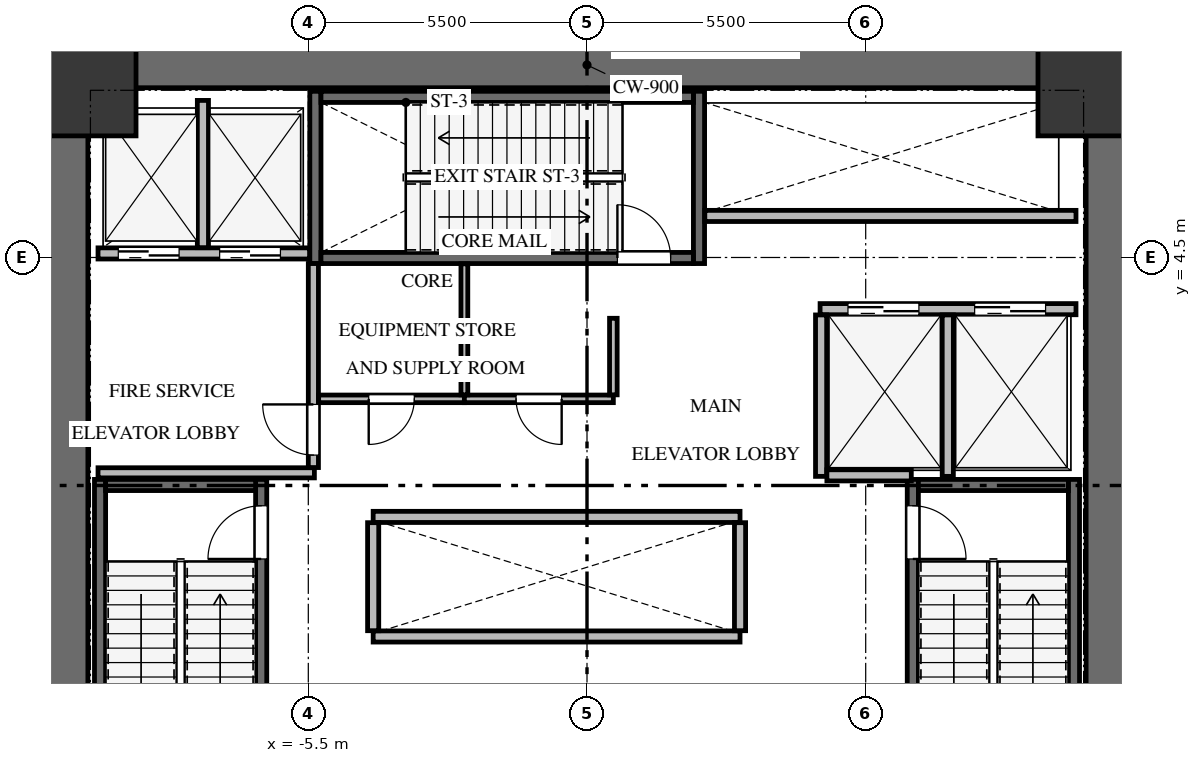
"""IFC4 building model, lengths in metres.
Left out: names, types, materials, properties, quantities, classifications, styles, units other than length and angle.
Written with IfcOpenShell. Run it as: python <this file> out.ifc"""

import sys

from ifc_helpers import new_model, si_unit, direction, frame, frame_2d, origin, origin_2d, place, context, subcontext, project, spatial, rectangle, extrude, source, transform, mapped, element, fill, save


model = new_model("IFC4")
c1 = context("Model", 3, precision=1e-05, world=origin(), true_north=direction((0.0, 1.0)))
c2 = subcontext(c1, "Body", "Model", "MODEL_VIEW")
j1 = project(units=[si_unit("LENGTHUNIT", "METRE"), si_unit("PLANEANGLEUNIT", "RADIAN")], contexts=[c1])
p1 = place(None, origin())
s1 = spatial("IfcSite", under=j1, at=p1, CompositionType="ELEMENT")
p2 = place(p1, origin())
s2 = spatial("IfcBuilding", under=s1, at=p2, CompositionType="ELEMENT")
p3 = place(p2, frame((0.0, 0.0, 15.6)))
s3 = spatial("IfcBuildingStorey", under=s2, at=p3, CompositionType="ELEMENT", Elevation=15.6)
for number, where, z_axis, x_axis in (
    (1, (-10.3, -8.75, 0.0), (0.0, 0.0, 1.0), (0.0, 1.0, 0.0)),
    (2, (10.3, -8.75, 0.0), (0.0, 0.0, 1.0), (0.0, 1.0, 0.0)),
):
    element("IfcWall", number, at=place(p3, frame(where, z_axis=z_axis, x_axis=x_axis)), inside=s3, PredefinedType="SHEAR", context=c2, shape_type="SweptSolid", body=[
        extrude(rectangle(XDim=17.5, YDim=0.9, at=frame_2d((8.75, 0.0))), origin(), (0.0, 0.0, 1.0), 5.6),
    ])
p4 = place(p3, frame((-9.85, 8.3, 0.0), z_axis=(0.0, 0.0, 1.0), x_axis=(1.0, 0.0, 0.0)))
e3 = element("IfcWall", 3, at=p4, inside=s3, PredefinedType="SHEAR", context=c2, shape_type="SweptSolid", body=[
    extrude(rectangle(XDim=19.7, YDim=0.9, at=frame_2d((9.85, 0.0))), origin(), (0.0, 0.0, 1.0), 5.6),
])
p5 = place(p3, frame((-6.43, -7.77, -0.32), z_axis=(0.0, 0.0, 1.0), x_axis=(0.0, 1.0, 0.0)))
e4 = element("IfcWall", 4, at=p5, inside=s3, PredefinedType="SHEAR", context=c2, shape_type="SweptSolid", body=[
    extrude(rectangle(XDim=7.89, YDim=0.22, at=frame_2d((3.945, 0.0))), origin(), (0.0, 0.0, 1.0), 5.6),
])
p6 = place(p5, frame((6.32, 0.0, 0.0)))
e5 = element("IfcOpeningElement", 5, at=p6, cuts=e4, PredefinedType="OPENING", context=c2, shape_type="SweptSolid", body=[
    extrude(rectangle(XDim=1.05, YDim=2.15, at=frame_2d((0.525, 1.075))), frame((0.0, 0.12, 0.0), z_axis=(0.0, -1.0, 0.0), x_axis=(1.0, 0.0, 0.0)), (0.0, 0.0, 1.0), 0.24),
])
p7 = place(p3, frame((-9.61, 0.12, -0.32), z_axis=(0.0, 0.0, 1.0), x_axis=(0.0, -1.0, 0.0)))
e6 = element("IfcWall", 6, at=p7, inside=s3, PredefinedType="SHEAR", context=c2, shape_type="SweptSolid", body=[
    extrude(rectangle(XDim=7.89, YDim=0.22, at=frame_2d((3.945, 0.0))), origin(), (0.0, 0.0, 1.0), 5.6),
])
p8 = place(p3, frame((-6.54, 0.01, -0.32), z_axis=(0.0, 0.0, 1.0), x_axis=(-1.0, 0.0, 0.0)))
e7 = element("IfcWall", 7, at=p8, inside=s3, PredefinedType="SHEAR", context=c2, shape_type="SweptSolid", body=[
    extrude(rectangle(XDim=2.96, YDim=0.22, at=frame_2d((1.48, 0.0))), origin(), (0.0, 0.0, 1.0), 5.6),
])
p9 = place(p3, frame((9.61, -7.77, -0.32), z_axis=(0.0, 0.0, 1.0), x_axis=(0.0, 1.0, 0.0)))
e8 = element("IfcWall", 8, at=p9, inside=s3, PredefinedType="SHEAR", context=c2, shape_type="SweptSolid", body=[
    extrude(rectangle(XDim=7.89, YDim=0.22, at=frame_2d((3.945, 0.0))), origin(), (0.0, 0.0, 1.0), 5.6),
])
p10 = place(p3, frame((6.43, 0.12, -0.32), z_axis=(0.0, 0.0, 1.0), x_axis=(0.0, -1.0, 0.0)))
e9 = element("IfcWall", 9, at=p10, inside=s3, PredefinedType="SHEAR", context=c2, shape_type="SweptSolid", body=[
    extrude(rectangle(XDim=7.89, YDim=0.22, at=frame_2d((3.945, 0.0))), origin(), (0.0, 0.0, 1.0), 5.6),
])
p11 = place(p10, frame((0.52, 0.0, 0.0)))
e10 = element("IfcOpeningElement", 10, at=p11, cuts=e9, PredefinedType="OPENING", context=c2, shape_type="SweptSolid", body=[
    extrude(rectangle(XDim=1.05, YDim=2.15, at=frame_2d((0.525, 1.075))), frame((0.0, 0.12, 0.0), z_axis=(0.0, -1.0, 0.0), x_axis=(1.0, 0.0, 0.0)), (0.0, 0.0, 1.0), 0.24),
])
p12 = place(p3, frame((9.5, 0.01, -0.32), z_axis=(0.0, 0.0, 1.0), x_axis=(-1.0, 0.0, 0.0)))
e11 = element("IfcWall", 11, at=p12, inside=s3, PredefinedType="SHEAR", context=c2, shape_type="SweptSolid", body=[
    extrude(rectangle(XDim=2.96, YDim=0.22, at=frame_2d((1.48, 0.0))), origin(), (0.0, 0.0, 1.0), 5.6),
])
for number, where, z_axis, x_axis in (
    (12, (2.21, 4.38, -0.32), (0.0, 0.0, 1.0), (0.0, 1.0, 0.0)),
    (13, (-5.36, 7.78, -0.32), (0.0, 0.0, 1.0), (0.0, -1.0, 0.0)),
):
    element("IfcWall", number, at=place(p3, frame(where, z_axis=z_axis, x_axis=x_axis)), inside=s3, PredefinedType="SHEAR", context=c2, shape_type="SweptSolid", body=[
        extrude(rectangle(XDim=3.4, YDim=0.22, at=frame_2d((1.7, 0.0))), origin(), (0.0, 0.0, 1.0), 5.6),
    ])
p13 = place(p3, frame((-5.25, 4.49, -0.32), z_axis=(0.0, 0.0, 1.0), x_axis=(1.0, 0.0, 0.0)))
e14 = element("IfcWall", 14, at=p13, inside=s3, PredefinedType="SHEAR", context=c2, shape_type="SweptSolid", body=[
    extrude(rectangle(XDim=7.35, YDim=0.22, at=frame_2d((3.675, 0.0))), origin(), (0.0, 0.0, 1.0), 5.6),
])
p14 = place(p13, frame((5.85, 0.0, 0.0)))
e15 = element("IfcOpeningElement", 15, at=p14, cuts=e14, PredefinedType="OPENING", context=c2, shape_type="SweptSolid", body=[
    extrude(rectangle(XDim=1.05, YDim=2.15, at=frame_2d((0.525, 1.075))), frame((0.0, 0.12, 0.0), z_axis=(0.0, -1.0, 0.0), x_axis=(1.0, 0.0, 0.0)), (0.0, 0.0, 1.0), 0.24),
])
p15 = place(p3, frame((2.1, 7.67, -0.32), z_axis=(0.0, 0.0, 1.0), x_axis=(-1.0, 0.0, 0.0)))
e16 = element("IfcWall", 16, at=p15, inside=s3, PredefinedType="SHEAR", context=c2, shape_type="SweptSolid", body=[
    extrude(rectangle(XDim=7.35, YDim=0.22, at=frame_2d((3.675, 0.0))), origin(), (0.0, 0.0, 1.0), 5.6),
])
m1 = source(origin(), c2, "Body", "SweptSolid", [
    extrude(rectangle(XDim=1.8, YDim=1.8, at=origin_2d()), origin(), (0.0, 0.0, 1.0), 5.6),
])
for number, where, z_axis, x_axis in (
    (17, (9.8, 7.8, -0.32), (0.0, 0.0, 1.0), (1.0, 0.0, 0.0)),
    (18, (-9.8, 7.8, -0.32), (0.0, 0.0, 1.0), (1.0, 0.0, 0.0)),
):
    element("IfcColumn", number, at=place(p3, frame(where, z_axis=z_axis, x_axis=x_axis)), inside=s3, PredefinedType="COLUMN", context=c2, shape_type="MappedRepresentation", body=[
        mapped(m1, transform((0.0, 0.0, 0.0), x_axis=(1.0, 0.0, 0.0), y_axis=(0.0, 1.0, 0.0), z_axis=(0.0, 0.0, 1.0), scale=1.0)),
    ])
p16 = place(p3, frame((-9.65, 4.58, 0.0), z_axis=(0.0, 0.0, 1.0), x_axis=(1.0, 0.0, 0.0)))
e19 = element("IfcWall", 19, at=p16, inside=s3, PredefinedType="SOLIDWALL", context=c2, shape_type="SweptSolid", body=[
    extrude(rectangle(XDim=4.175, YDim=0.22, at=frame_2d((2.087, 0.0))), origin(), (0.0, 0.0, 1.0), 5.265),
])
p17 = place(p16, frame((0.4, 0.0, 0.0)))
e20 = element("IfcOpeningElement", 20, at=p17, cuts=e19, PredefinedType="OPENING", context=c2, shape_type="SweptSolid", body=[
    extrude(rectangle(XDim=1.2, YDim=2.15, at=frame_2d((0.6, 1.075))), frame((0.0, 0.12, 0.0), z_axis=(0.0, -1.0, 0.0), x_axis=(1.0, 0.0, 0.0)), (0.0, 0.0, 1.0), 0.24),
])
p18 = place(p16, frame((2.4, 0.0, 0.0)))
e21 = element("IfcOpeningElement", 21, at=p18, cuts=e19, PredefinedType="OPENING", context=c2, shape_type="SweptSolid", body=[
    extrude(rectangle(XDim=1.2, YDim=2.15, at=frame_2d((0.6, 1.075))), frame((0.0, 0.12, 0.0), z_axis=(0.0, -1.0, 0.0), x_axis=(1.0, 0.0, 0.0)), (0.0, 0.0, 1.0), 0.24),
])
p19 = place(p3, frame((-7.58, 4.694, 0.0), z_axis=(0.0, 0.0, 1.0), x_axis=(0.0, 1.0, 0.0)))
e22 = element("IfcWall", 22, at=p19, inside=s3, PredefinedType="SOLIDWALL", context=c2, shape_type="SweptSolid", body=[
    extrude(rectangle(XDim=2.906, YDim=0.22, at=frame_2d((1.453, 0.0))), origin(), (0.0, 0.0, 1.0), 5.265),
])
p20 = place(p3, frame((-9.65, 0.25, 0.0), z_axis=(0.0, 0.0, 1.0), x_axis=(1.0, 0.0, 0.0)))
e23 = element("IfcWall", 23, at=p20, inside=s3, PredefinedType="SOLIDWALL", context=c2, shape_type="SweptSolid", body=[
    extrude(rectangle(XDim=4.27, YDim=0.2, at=frame_2d((2.135, 0.0))), origin(), (0.0, 0.0, 1.0), 5.265),
])
p21 = place(p3, frame((-5.4, 0.354, 0.0), z_axis=(0.0, 0.0, 1.0), x_axis=(0.0, 1.0, 0.0)))
e24 = element("IfcWall", 24, at=p21, inside=s3, PredefinedType="SOLIDWALL", context=c2, shape_type="SweptSolid", body=[
    extrude(rectangle(XDim=4.026, YDim=0.2, at=frame_2d((2.013, 0.0))), origin(), (0.0, 0.0, 1.0), 5.265),
])
p22 = place(p21, frame((0.246, 0.0, 0.0)))
e25 = element("IfcOpeningElement", 25, at=p22, cuts=e24, PredefinedType="OPENING", context=c2, shape_type="SweptSolid", body=[
    extrude(rectangle(XDim=1.0, YDim=2.15, at=frame_2d((0.5, 1.075))), frame((0.0, 0.11, 0.0), z_axis=(0.0, -1.0, 0.0), x_axis=(1.0, 0.0, 0.0)), (0.0, 0.0, 1.0), 0.22),
])
p23 = place(p3, frame((4.6, 3.48, 0.0), z_axis=(0.0, 0.0, 1.0), x_axis=(1.0, 0.0, 0.0)))
e26 = element("IfcWall", 26, at=p23, inside=s3, PredefinedType="SOLIDWALL", context=c2, shape_type="SweptSolid", body=[
    extrude(rectangle(XDim=5.05, YDim=0.22, at=frame_2d((2.525, 0.0))), origin(), (0.0, 0.0, 1.0), 5.265),
])
p24 = place(p23, frame((0.55, 0.0, 0.0)))
e27 = element("IfcOpeningElement", 27, at=p24, cuts=e26, PredefinedType="OPENING", context=c2, shape_type="SweptSolid", body=[
    extrude(rectangle(XDim=1.4, YDim=2.15, at=frame_2d((0.7, 1.075))), frame((0.0, 0.12, 0.0), z_axis=(0.0, -1.0, 0.0), x_axis=(1.0, 0.0, 0.0)), (0.0, 0.0, 1.0), 0.24),
])
p25 = place(p23, frame((3.05, 0.0, 0.0)))
e28 = element("IfcOpeningElement", 28, at=p25, cuts=e26, PredefinedType="OPENING", context=c2, shape_type="SweptSolid", body=[
    extrude(rectangle(XDim=1.4, YDim=2.15, at=frame_2d((0.7, 1.075))), frame((0.0, 0.12, 0.0), z_axis=(0.0, -1.0, 0.0), x_axis=(1.0, 0.0, 0.0)), (0.0, 0.0, 1.0), 0.24),
])
for number, where, z_axis, x_axis in (
    (29, (4.62, 0.18, 0.0), (0.0, 0.0, 1.0), (0.0, 1.0, 0.0)),
    (30, (7.12, 0.18, 0.0), (0.0, 0.0, 1.0), (0.0, 1.0, 0.0)),
):
    element("IfcWall", number, at=place(p3, frame(where, z_axis=z_axis, x_axis=x_axis)), inside=s3, PredefinedType="SOLIDWALL", context=c2, shape_type="SweptSolid", body=[
        extrude(rectangle(XDim=3.186, YDim=0.22, at=frame_2d((1.593, 0.0))), origin(), (0.0, 0.0, 1.0), 5.265),
    ])
p26 = place(p3, frame((4.734, 0.2, 0.0), z_axis=(0.0, 0.0, 1.0), x_axis=(1.0, 0.0, 0.0)))
e31 = element("IfcWall", 31, at=p26, inside=s3, PredefinedType="SOLIDWALL", context=c2, shape_type="SweptSolid", body=[
    extrude(rectangle(XDim=1.666, YDim=0.22, at=frame_2d((0.833, 0.0))), origin(), (0.0, 0.0, 1.0), 5.265),
])
for number, where, z_axis, x_axis in (
    (32, (-4.22, -2.98, 0.0), (0.0, 0.0, 1.0), (1.0, 0.0, 0.0)),
    (33, (-4.22, -0.62, 0.0), (0.0, 0.0, 1.0), (1.0, 0.0, 0.0)),
):
    element("IfcWall", number, at=place(p3, frame(where, z_axis=z_axis, x_axis=x_axis)), inside=s3, PredefinedType="SOLIDWALL", context=c2, shape_type="SweptSolid", body=[
        extrude(rectangle(XDim=7.24, YDim=0.22, at=frame_2d((3.62, 0.0))), origin(), (0.0, 0.0, 1.0), 5.265),
    ])
for number, where, z_axis, x_axis in (
    (34, (-4.22, -2.866, 0.0), (0.0, 0.0, 1.0), (0.0, 1.0, 0.0)),
    (35, (3.02, -2.866, 0.0), (0.0, 0.0, 1.0), (0.0, 1.0, 0.0)),
):
    element("IfcWall", number, at=place(p3, frame(where, z_axis=z_axis, x_axis=x_axis)), inside=s3, PredefinedType="SOLIDWALL", context=c2, shape_type="SweptSolid", body=[
        extrude(rectangle(XDim=2.132, YDim=0.22, at=frame_2d((1.066, 0.0))), origin(), (0.0, 0.0, 1.0), 5.265),
    ])
p27 = place(p3, frame((2.325, 5.32, 0.0), z_axis=(0.0, 0.0, 1.0), x_axis=(1.0, 0.0, 0.0)))
e36 = element("IfcWall", 36, at=p27, inside=s3, PredefinedType="SOLIDWALL", context=c2, shape_type="SweptSolid", body=[
    extrude(rectangle(XDim=7.325, YDim=0.22, at=frame_2d((3.663, 0.0))), origin(), (0.0, 0.0, 1.0), 5.265),
])
p28 = place(p3, frame((-2.42, 1.71, 0.0), z_axis=(0.0, 0.0, 1.0), x_axis=(-1.0, 0.0, 0.0)))
e37 = element("IfcWall", 37, at=p28, inside=s3, PredefinedType="PARTITIONING", context=c2, shape_type="SweptSolid", body=[
    extrude(rectangle(XDim=2.876, YDim=0.15, at=frame_2d((1.438, 0.0))), origin(), (0.0, 0.0, 1.0), 5.265),
])
p29 = place(p28, frame((0.988, 0.0, 0.0)))
e38 = element("IfcOpeningElement", 38, at=p29, cuts=e37, PredefinedType="OPENING", context=c2, shape_type="SweptSolid", body=[
    extrude(rectangle(XDim=0.9, YDim=2.05, at=frame_2d((0.45, 1.025))), frame((0.0, 0.085, 0.0), z_axis=(0.0, -1.0, 0.0), x_axis=(1.0, 0.0, 0.0)), (0.0, 0.0, 1.0), 0.17),
])
p30 = place(p3, frame((0.52, 1.71, 0.0), z_axis=(0.0, 0.0, 1.0), x_axis=(-1.0, 0.0, 0.0)))
e39 = element("IfcWall", 39, at=p30, inside=s3, PredefinedType="PARTITIONING", context=c2, shape_type="SweptSolid", body=[
    extrude(rectangle(XDim=2.94, YDim=0.15, at=frame_2d((1.47, 0.0))), origin(), (0.0, 0.0, 1.0), 5.265),
])
p31 = place(p30, frame((1.02, 0.0, 0.0)))
e40 = element("IfcOpeningElement", 40, at=p31, cuts=e39, PredefinedType="OPENING", context=c2, shape_type="SweptSolid", body=[
    extrude(rectangle(XDim=0.9, YDim=2.05, at=frame_2d((0.45, 1.025))), frame((0.0, 0.085, 0.0), z_axis=(0.0, -1.0, 0.0), x_axis=(1.0, 0.0, 0.0)), (0.0, 0.0, 1.0), 0.17),
])
p32 = place(p3, frame((0.52, 3.3, 0.0), z_axis=(0.0, 0.0, 1.0), x_axis=(0.0, -1.0, 0.0)))
e41 = element("IfcWall", 41, at=p32, inside=s3, PredefinedType="PARTITIONING", context=c2, shape_type="SweptSolid", body=[
    extrude(rectangle(XDim=1.511, YDim=0.15, at=frame_2d((0.755, 0.0))), origin(), (0.0, 0.0, 1.0), 5.265),
])
p33 = place(p3, frame((-2.42, 4.375, 0.0), z_axis=(0.0, 0.0, 1.0), x_axis=(0.0, -1.0, 0.0)))
e42 = element("IfcWall", 42, at=p33, inside=s3, PredefinedType="PARTITIONING", context=c2, shape_type="SweptSolid", body=[
    extrude(rectangle(XDim=2.586, YDim=0.135, at=frame_2d((1.293, 0.0))), origin(), (0.0, 0.0, 1.0), 5.265),
])
m2 = source(origin(), c2, "Body", "SweptSolid", [
    extrude(rectangle(XDim=1.05, YDim=2.15, at=frame_2d((0.525, 1.075))), frame((0.0, 0.025, 0.0), z_axis=(0.0, -1.0, 0.0), x_axis=(1.0, 0.0, 0.0)), (0.0, 0.0, 1.0), 0.05),
])
p34 = place(p6, origin())
e43 = element("IfcDoor", 43, at=p34, inside=s3, OperationType="SINGLE_SWING_LEFT", PredefinedType="DOOR", context=c2, shape_type="MappedRepresentation", body=[
    mapped(m2, transform((0.0, 0.0, 0.0), x_axis=(1.0, 0.0, 0.0), y_axis=(0.0, 1.0, 0.0), z_axis=(0.0, 0.0, 1.0), scale=1.0)),
])
fill(e5, e43)
m3 = source(origin(), c2, "Body", "SweptSolid", [
    extrude(rectangle(XDim=1.05, YDim=2.15, at=frame_2d((0.525, 1.075))), frame((0.0, 0.025, 0.0), z_axis=(0.0, -1.0, 0.0), x_axis=(1.0, 0.0, 0.0)), (0.0, 0.0, 1.0), 0.05),
])
p35 = place(p11, origin())
e44 = element("IfcDoor", 44, at=p35, inside=s3, OperationType="SINGLE_SWING_RIGHT", PredefinedType="DOOR", context=c2, shape_type="MappedRepresentation", body=[
    mapped(m3, transform((0.0, 0.0, 0.0), x_axis=(1.0, 0.0, 0.0), y_axis=(0.0, 1.0, 0.0), z_axis=(0.0, 0.0, 1.0), scale=1.0)),
])
fill(e10, e44)
p36 = place(p14, origin())
e45 = element("IfcDoor", 45, at=p36, inside=s3, OperationType="SINGLE_SWING_LEFT", PredefinedType="DOOR", context=c2, shape_type="MappedRepresentation", body=[
    mapped(m2, transform((0.0, 0.0, 0.0), x_axis=(1.0, 0.0, 0.0), y_axis=(0.0, 1.0, 0.0), z_axis=(0.0, 0.0, 1.0), scale=1.0)),
])
fill(e15, e45)
m4 = source(origin(), c2, "Body", "SweptSolid", [
    extrude(rectangle(XDim=1.2, YDim=2.15, at=frame_2d((0.6, 1.075))), frame((0.0, 0.025, 0.0), z_axis=(0.0, -1.0, 0.0), x_axis=(1.0, 0.0, 0.0)), (0.0, 0.0, 1.0), 0.05),
])
p37 = place(p17, origin())
e46 = element("IfcDoor", 46, at=p37, inside=s3, OperationType="DOUBLE_DOOR_SLIDING", PredefinedType="DOOR", context=c2, shape_type="MappedRepresentation", body=[
    mapped(m4, transform((0.0, 0.0, 0.0), x_axis=(1.0, 0.0, 0.0), y_axis=(0.0, 1.0, 0.0), z_axis=(0.0, 0.0, 1.0), scale=1.0)),
])
fill(e20, e46)
p38 = place(p18, origin())
e47 = element("IfcDoor", 47, at=p38, inside=s3, OperationType="DOUBLE_DOOR_SLIDING", PredefinedType="DOOR", context=c2, shape_type="MappedRepresentation", body=[
    mapped(m4, transform((0.0, 0.0, 0.0), x_axis=(1.0, 0.0, 0.0), y_axis=(0.0, 1.0, 0.0), z_axis=(0.0, 0.0, 1.0), scale=1.0)),
])
fill(e21, e47)
m5 = source(origin(), c2, "Body", "SweptSolid", [
    extrude(rectangle(XDim=1.0, YDim=2.15, at=frame_2d((0.5, 1.075))), frame((0.0, 0.025, 0.0), z_axis=(0.0, -1.0, 0.0), x_axis=(1.0, 0.0, 0.0)), (0.0, 0.0, 1.0), 0.05),
])
p39 = place(p22, origin())
e48 = element("IfcDoor", 48, at=p39, inside=s3, OperationType="SINGLE_SWING_RIGHT", PredefinedType="DOOR", context=c2, shape_type="MappedRepresentation", body=[
    mapped(m5, transform((0.0, 0.0, 0.0), x_axis=(1.0, 0.0, 0.0), y_axis=(0.0, 1.0, 0.0), z_axis=(0.0, 0.0, 1.0), scale=1.0)),
])
fill(e25, e48)
m6 = source(origin(), c2, "Body", "SweptSolid", [
    extrude(rectangle(XDim=1.4, YDim=2.15, at=frame_2d((0.7, 1.075))), frame((0.0, 0.025, 0.0), z_axis=(0.0, -1.0, 0.0), x_axis=(1.0, 0.0, 0.0)), (0.0, 0.0, 1.0), 0.05),
])
p40 = place(p24, origin())
e49 = element("IfcDoor", 49, at=p40, inside=s3, OperationType="DOUBLE_DOOR_SLIDING", PredefinedType="DOOR", context=c2, shape_type="MappedRepresentation", body=[
    mapped(m6, transform((0.0, 0.0, 0.0), x_axis=(1.0, 0.0, 0.0), y_axis=(0.0, 1.0, 0.0), z_axis=(0.0, 0.0, 1.0), scale=1.0)),
])
fill(e27, e49)
p41 = place(p25, origin())
e50 = element("IfcDoor", 50, at=p41, inside=s3, OperationType="DOUBLE_DOOR_SLIDING", PredefinedType="DOOR", context=c2, shape_type="MappedRepresentation", body=[
    mapped(m6, transform((0.0, 0.0, 0.0), x_axis=(1.0, 0.0, 0.0), y_axis=(0.0, 1.0, 0.0), z_axis=(0.0, 0.0, 1.0), scale=1.0)),
])
fill(e28, e50)
m7 = source(origin(), c2, "Body", "SweptSolid", [
    extrude(rectangle(XDim=0.9, YDim=2.05, at=frame_2d((0.45, 1.025))), frame((0.0, 0.025, 0.0), z_axis=(0.0, -1.0, 0.0), x_axis=(1.0, 0.0, 0.0)), (0.0, 0.0, 1.0), 0.05),
])
p42 = place(p29, origin())
e51 = element("IfcDoor", 51, at=p42, inside=s3, OperationType="SINGLE_SWING_RIGHT", PredefinedType="DOOR", context=c2, shape_type="MappedRepresentation", body=[
    mapped(m7, transform((0.0, 0.0, 0.0), x_axis=(1.0, 0.0, 0.0), y_axis=(0.0, 1.0, 0.0), z_axis=(0.0, 0.0, 1.0), scale=1.0)),
])
fill(e38, e51)
m8 = source(origin(), c2, "Body", "SweptSolid", [
    extrude(rectangle(XDim=0.9, YDim=2.05, at=frame_2d((0.45, 1.025))), frame((0.0, 0.025, 0.0), z_axis=(0.0, -1.0, 0.0), x_axis=(1.0, 0.0, 0.0)), (0.0, 0.0, 1.0), 0.05),
])
p43 = place(p31, origin())
e52 = element("IfcDoor", 52, at=p43, inside=s3, OperationType="SINGLE_SWING_LEFT", PredefinedType="DOOR", context=c2, shape_type="MappedRepresentation", body=[
    mapped(m8, transform((0.0, 0.0, 0.0), x_axis=(1.0, 0.0, 0.0), y_axis=(0.0, 1.0, 0.0), z_axis=(0.0, 0.0, 1.0), scale=1.0)),
])
fill(e40, e52)
save(model, sys.argv[1])
